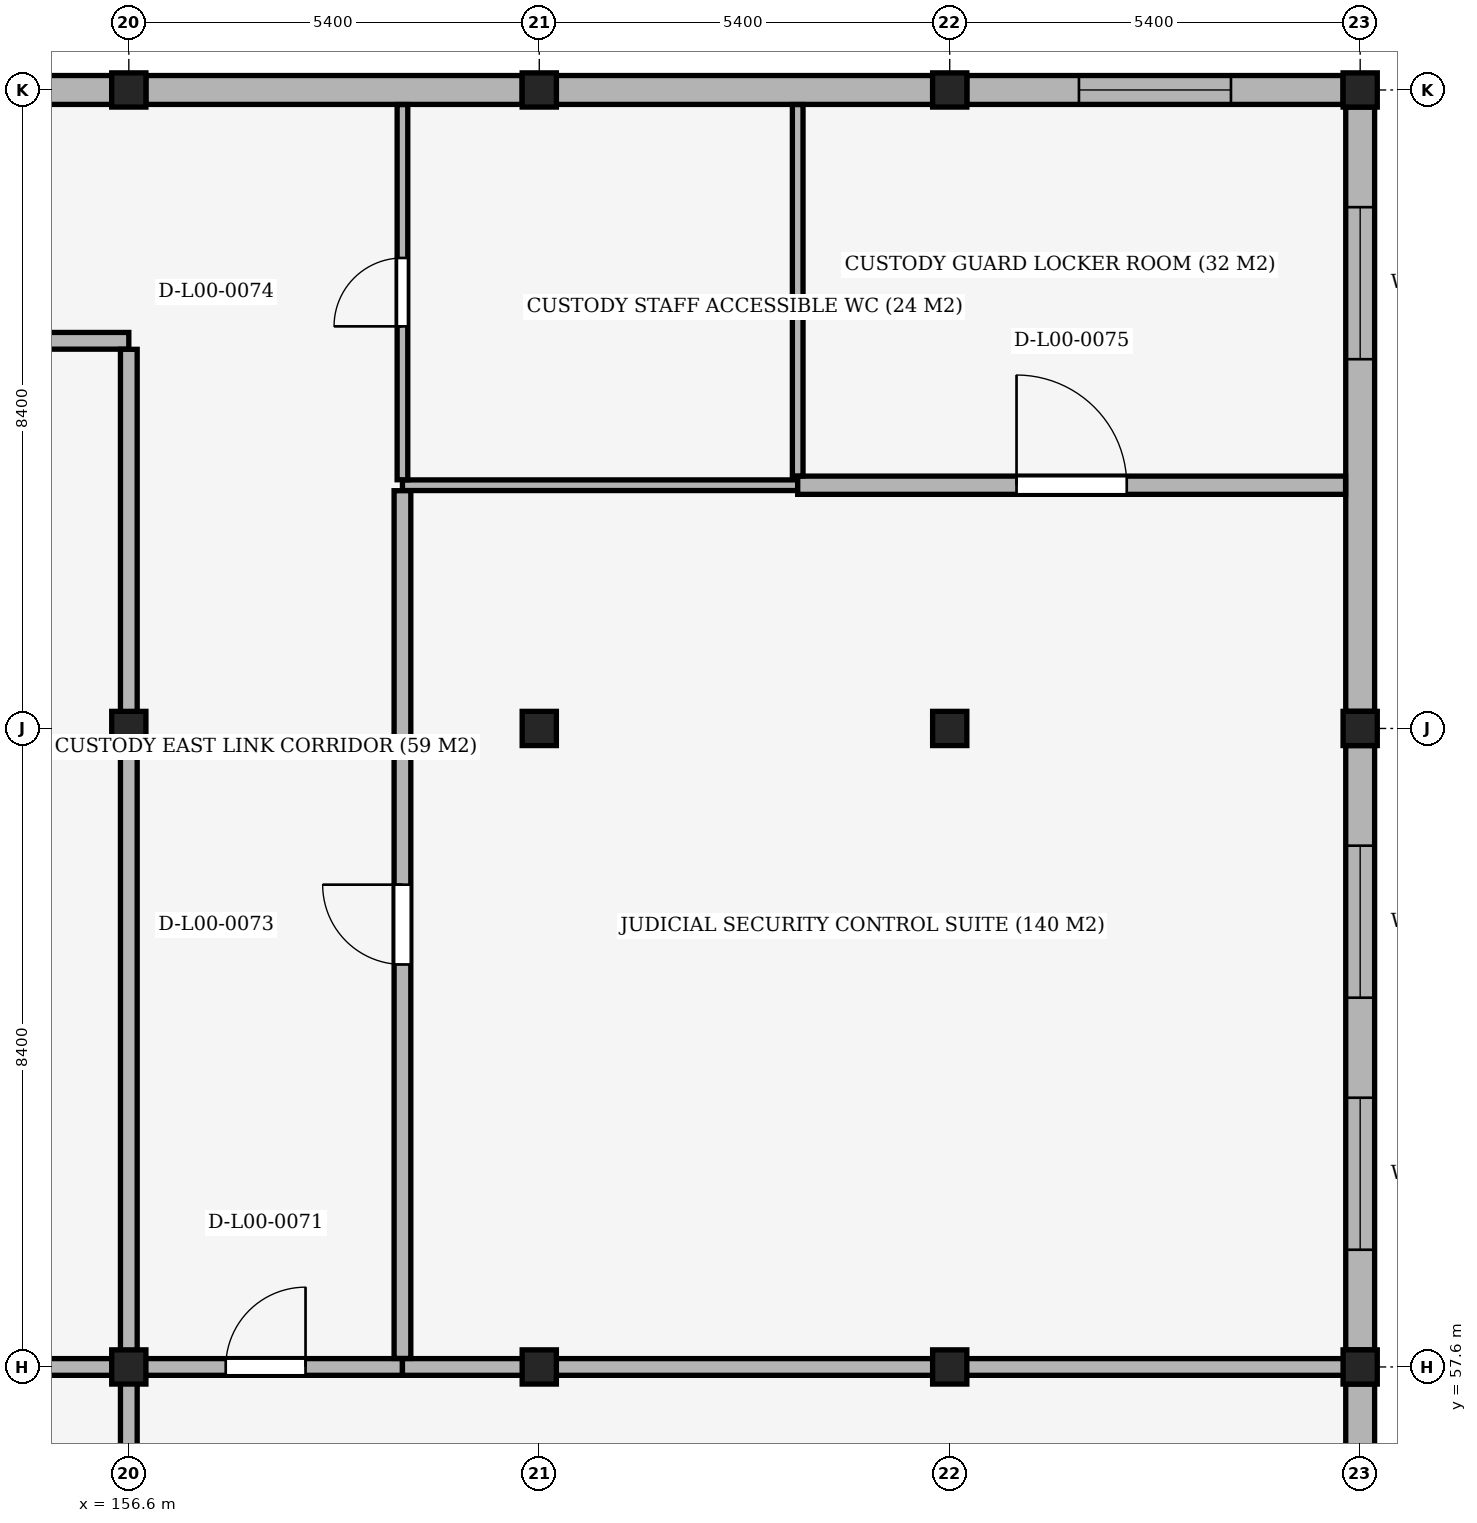
"""IFC4 building model, lengths in metres.
Left out: names, types, materials, properties, quantities, classifications, styles, units other than length and angle.
Written with IfcOpenShell. Run it as: python <this file> out.ifc"""

import sys

from ifc_helpers import new_model, si_unit, direction, frame, frame_2d, origin, origin_2d, place, context, subcontext, project, spatial, rectangle, extrude, element, fill, save


model = new_model("IFC4")
c1 = context("Model", 3, precision=1e-05, world=origin(), true_north=direction((0.0, 1.0)))
c2 = subcontext(c1, "Body", "Model", "MODEL_VIEW")
j1 = project(units=[si_unit("LENGTHUNIT", "METRE"), si_unit("PLANEANGLEUNIT", "RADIAN")], contexts=[c1])
p1 = place(None, origin())
s1 = spatial("IfcSite", under=j1, at=p1, CompositionType="ELEMENT")
p2 = place(p1, origin())
s2 = spatial("IfcBuilding", under=s1, at=p2, CompositionType="ELEMENT")
p3 = place(p2, origin())
s3 = spatial("IfcBuildingStorey", under=s2, at=p3, CompositionType="ELEMENT", Elevation=0.0)
for number, where, z_axis, x_axis in (
    (1, (156.6, 57.6, 0.0), (0.0, 0.0, 1.0), (1.0, 0.0, 0.0)),
    (2, (156.6, 66.0, 0.0), (0.0, 0.0, 1.0), (1.0, 0.0, 0.0)),
    (3, (156.6, 74.4, 0.0), (0.0, 0.0, 1.0), (1.0, 0.0, 0.0)),
    (4, (162.0, 57.6, 0.0), (0.0, 0.0, 1.0), (1.0, 0.0, 0.0)),
    (5, (162.0, 66.0, 0.0), (0.0, 0.0, 1.0), (1.0, 0.0, 0.0)),
    (6, (162.0, 74.4, 0.0), (0.0, 0.0, 1.0), (1.0, 0.0, 0.0)),
    (7, (167.4, 57.6, 0.0), (0.0, 0.0, 1.0), (1.0, 0.0, 0.0)),
    (8, (167.4, 66.0, 0.0), (0.0, 0.0, 1.0), (1.0, 0.0, 0.0)),
    (9, (167.4, 74.4, 0.0), (0.0, 0.0, 1.0), (1.0, 0.0, 0.0)),
    (10, (172.8, 57.6, 0.0), (0.0, 0.0, 1.0), (1.0, 0.0, 0.0)),
    (11, (172.8, 66.0, 0.0), (0.0, 0.0, 1.0), (1.0, 0.0, 0.0)),
    (12, (172.8, 74.4, 0.0), (0.0, 0.0, 1.0), (1.0, 0.0, 0.0)),
):
    element("IfcColumn", number, at=place(p3, frame(where, z_axis=z_axis, x_axis=x_axis)), inside=s3, PredefinedType="COLUMN", context=c2, shape_type="SweptSolid", body=[
        extrude(rectangle(XDim=0.45, YDim=0.45, at=origin_2d()), origin(), (0.0, 0.0, 1.0), 5.1),
    ])
p4 = place(p3, frame((151.425, 74.4, 0.0), z_axis=(0.0, 0.0, 1.0), x_axis=(1.0, 0.0, 0.0)))
e13 = element("IfcWall", 13, at=p4, inside=s3, PredefinedType="SOLIDWALL", context=c2, shape_type="SweptSolid", body=[
    extrude(rectangle(XDim=4.95, YDim=0.38, at=frame_2d((2.475, 0.0))), origin(), (0.0, 0.0, 1.0), 4.07),
])
p5 = place(p4, frame((1.475, 0.0, 2.1)))
e14 = element("IfcOpeningElement", 14, at=p5, cuts=e13, PredefinedType="OPENING", context=c2, shape_type="SweptSolid", body=[
    extrude(rectangle(XDim=2.0, YDim=1.2, at=frame_2d((1.0, 0.6))), frame((0.0, 0.205, 0.0), z_axis=(0.0, -1.0, 0.0), x_axis=(1.0, 0.0, 0.0)), (0.0, 0.0, 1.0), 0.41),
])
for number, where, z_axis, x_axis in (
    (15, (156.825, 74.4, 0.0), (0.0, 0.0, 1.0), (1.0, 0.0, 0.0)),
    (16, (162.225, 74.4, 0.0), (0.0, 0.0, 1.0), (1.0, 0.0, 0.0)),
):
    element("IfcWall", number, at=place(p3, frame(where, z_axis=z_axis, x_axis=x_axis)), inside=s3, PredefinedType="SOLIDWALL", context=c2, shape_type="SweptSolid", body=[
        extrude(rectangle(XDim=4.95, YDim=0.38, at=frame_2d((2.475, 0.0))), origin(), (0.0, 0.0, 1.0), 4.22),
    ])
p6 = place(p3, frame((167.625, 74.4, 0.0), z_axis=(0.0, 0.0, 1.0), x_axis=(1.0, 0.0, 0.0)))
e17 = element("IfcWall", 17, at=p6, inside=s3, PredefinedType="SOLIDWALL", context=c2, shape_type="SweptSolid", body=[
    extrude(rectangle(XDim=4.95, YDim=0.38, at=frame_2d((2.475, 0.0))), origin(), (0.0, 0.0, 1.0), 4.22),
])
p7 = place(p6, frame((1.475, 0.0, 2.1)))
e18 = element("IfcOpeningElement", 18, at=p7, cuts=e17, PredefinedType="OPENING", context=c2, shape_type="SweptSolid", body=[
    extrude(rectangle(XDim=2.0, YDim=1.2, at=frame_2d((1.0, 0.6))), frame((0.0, 0.205, 0.0), z_axis=(0.0, -1.0, 0.0), x_axis=(1.0, 0.0, 0.0)), (0.0, 0.0, 1.0), 0.41),
])
p8 = place(p3, frame((172.8, 74.175, 0.0), z_axis=(0.0, 0.0, 1.0), x_axis=(0.0, -1.0, 0.0)))
e19 = element("IfcWall", 19, at=p8, inside=s3, PredefinedType="SOLIDWALL", context=c2, shape_type="SweptSolid", body=[
    extrude(rectangle(XDim=7.95, YDim=0.38, at=frame_2d((3.975, 0.0))), origin(), (0.0, 0.0, 1.0), 4.02),
])
p9 = place(p8, frame((1.317, 0.0, 2.1)))
e20 = element("IfcOpeningElement", 20, at=p9, cuts=e19, PredefinedType="OPENING", context=c2, shape_type="SweptSolid", body=[
    extrude(rectangle(XDim=2.0, YDim=1.2, at=frame_2d((1.0, 0.6))), frame((0.0, 0.205, 0.0), z_axis=(0.0, -1.0, 0.0), x_axis=(1.0, 0.0, 0.0)), (0.0, 0.0, 1.0), 0.41),
])
p10 = place(p3, frame((172.8, 65.775, 0.0), z_axis=(0.0, 0.0, 1.0), x_axis=(0.0, -1.0, 0.0)))
e21 = element("IfcWall", 21, at=p10, inside=s3, PredefinedType="SOLIDWALL", context=c2, shape_type="SweptSolid", body=[
    extrude(rectangle(XDim=7.95, YDim=0.38, at=frame_2d((3.975, 0.0))), origin(), (0.0, 0.0, 1.0), 4.02),
])
p11 = place(p10, frame((1.317, 0.0, 2.1)))
e22 = element("IfcOpeningElement", 22, at=p11, cuts=e21, PredefinedType="OPENING", context=c2, shape_type="SweptSolid", body=[
    extrude(rectangle(XDim=2.0, YDim=1.2, at=frame_2d((1.0, 0.6))), frame((0.0, 0.205, 0.0), z_axis=(0.0, -1.0, 0.0), x_axis=(1.0, 0.0, 0.0)), (0.0, 0.0, 1.0), 0.41),
])
p12 = place(p10, frame((4.633, 0.0, 2.1)))
e23 = element("IfcOpeningElement", 23, at=p12, cuts=e21, PredefinedType="OPENING", context=c2, shape_type="SweptSolid", body=[
    extrude(rectangle(XDim=2.0, YDim=1.2, at=frame_2d((1.0, 0.6))), frame((0.0, 0.205, 0.0), z_axis=(0.0, -1.0, 0.0), x_axis=(1.0, 0.0, 0.0)), (0.0, 0.0, 1.0), 0.41),
])
p13 = place(p3, frame((172.8, 57.375, 0.0), z_axis=(0.0, 0.0, 1.0), x_axis=(0.0, -1.0, 0.0)))
e24 = element("IfcWall", 24, at=p13, inside=s3, PredefinedType="SOLIDWALL", context=c2, shape_type="SweptSolid", body=[
    extrude(rectangle(XDim=7.95, YDim=0.38, at=frame_2d((3.975, 0.0))), origin(), (0.0, 0.0, 1.0), 4.02),
])
p14 = place(p13, frame((1.317, 0.0, 2.1)))
e25 = element("IfcOpeningElement", 25, at=p14, cuts=e24, PredefinedType="OPENING", context=c2, shape_type="SweptSolid", body=[
    extrude(rectangle(XDim=2.0, YDim=1.2, at=frame_2d((1.0, 0.6))), frame((0.0, 0.205, 0.0), z_axis=(0.0, -1.0, 0.0), x_axis=(1.0, 0.0, 0.0)), (0.0, 0.0, 1.0), 0.41),
])
p15 = place(p13, frame((4.633, 0.0, 2.1)))
e26 = element("IfcOpeningElement", 26, at=p15, cuts=e24, PredefinedType="OPENING", context=c2, shape_type="SweptSolid", body=[
    extrude(rectangle(XDim=2.0, YDim=1.2, at=frame_2d((1.0, 0.6))), frame((0.0, 0.205, 0.0), z_axis=(0.0, -1.0, 0.0), x_axis=(1.0, 0.0, 0.0)), (0.0, 0.0, 1.0), 0.41),
])
p16 = place(p3, frame((138.4, 57.6, 0.0), z_axis=(0.0, 0.0, 1.0), x_axis=(1.0, 0.0, 0.0)))
e27 = element("IfcWall", 27, at=p16, inside=s3, PredefinedType="PARTITIONING", context=c2, shape_type="SweptSolid", body=[
    extrude(rectangle(XDim=18.2, YDim=0.22, at=frame_2d((9.1, 0.0))), origin(), (0.0, 0.0, 1.0), 4.02),
])
p17 = place(p3, frame((156.6, 57.6, 0.0), z_axis=(0.0, 0.0, 1.0), x_axis=(1.0, 0.0, 0.0)))
e28 = element("IfcWall", 28, at=p17, inside=s3, PredefinedType="PARTITIONING", context=c2, shape_type="SweptSolid", body=[
    extrude(rectangle(XDim=3.6, YDim=0.22, at=frame_2d((1.8, 0.0))), origin(), (0.0, 0.0, 1.0), 4.02),
])
p18 = place(p17, frame((1.275, 0.0, 0.0)))
e29 = element("IfcOpeningElement", 29, at=p18, cuts=e28, PredefinedType="OPENING", context=c2, shape_type="SweptSolid", body=[
    extrude(rectangle(XDim=1.05, YDim=2.15, at=frame_2d((0.525, 1.075))), frame((0.0, 0.125, 0.0), z_axis=(0.0, -1.0, 0.0), x_axis=(1.0, 0.0, 0.0)), (0.0, 0.0, 1.0), 0.25),
])
p19 = place(p3, frame((160.2, 57.6, 0.0), z_axis=(0.0, 0.0, 1.0), x_axis=(1.0, 0.0, 0.0)))
e30 = element("IfcWall", 30, at=p19, inside=s3, PredefinedType="PARTITIONING", context=c2, shape_type="SweptSolid", body=[
    extrude(rectangle(XDim=12.541, YDim=0.22, at=frame_2d((6.271, 0.0))), origin(), (0.0, 0.0, 1.0), 4.02),
])
p20 = place(p3, frame((160.2, 69.2, 0.0), z_axis=(0.0, 0.0, 1.0), x_axis=(1.0, 0.0, 0.0)))
e31 = element("IfcWall", 31, at=p20, inside=s3, PredefinedType="PARTITIONING", context=c2, shape_type="SweptSolid", body=[
    extrude(rectangle(XDim=5.2, YDim=0.14, at=frame_2d((2.6, 0.0))), origin(), (0.0, 0.0, 1.0), 4.02),
])
p21 = place(p3, frame((165.4, 69.2, 0.0), z_axis=(0.0, 0.0, 1.0), x_axis=(1.0, 0.0, 0.0)))
e32 = element("IfcWall", 32, at=p21, inside=s3, PredefinedType="PARTITIONING", context=c2, shape_type="SweptSolid", body=[
    extrude(rectangle(XDim=7.208, YDim=0.24, at=frame_2d((3.604, 0.0))), origin(), (0.0, 0.0, 1.0), 4.02),
])
p22 = place(p21, frame((2.879, 0.0, 0.0)))
e33 = element("IfcOpeningElement", 33, at=p22, cuts=e32, PredefinedType="OPENING", context=c2, shape_type="SweptSolid", body=[
    extrude(rectangle(XDim=1.45, YDim=2.25, at=frame_2d((0.725, 1.125))), frame((0.0, 0.135, 0.0), z_axis=(0.0, -1.0, 0.0), x_axis=(1.0, 0.0, 0.0)), (0.0, 0.0, 1.0), 0.27),
])
p23 = place(p3, frame((138.4, 71.1, 0.0), z_axis=(0.0, 0.0, 1.0), x_axis=(1.0, 0.0, 0.0)))
e34 = element("IfcWall", 34, at=p23, inside=s3, PredefinedType="PARTITIONING", context=c2, shape_type="SweptSolid", body=[
    extrude(rectangle(XDim=18.2, YDim=0.22, at=frame_2d((9.1, 0.0))), origin(), (0.0, 0.0, 1.0), 4.02),
])
p24 = place(p23, frame((8.575, 0.0, 0.0)))
e35 = element("IfcOpeningElement", 35, at=p24, cuts=e34, PredefinedType="OPENING", context=c2, shape_type="SweptSolid", body=[
    extrude(rectangle(XDim=1.05, YDim=2.15, at=frame_2d((0.525, 1.075))), frame((0.0, 0.125, 0.0), z_axis=(0.0, -1.0, 0.0), x_axis=(1.0, 0.0, 0.0)), (0.0, 0.0, 1.0), 0.25),
])
p25 = place(p3, frame((156.6, 40.853, 0.0), z_axis=(0.0, 0.0, 1.0), x_axis=(0.0, 1.0, 0.0)))
e36 = element("IfcWall", 36, at=p25, inside=s3, PredefinedType="PARTITIONING", context=c2, shape_type="SweptSolid", body=[
    extrude(rectangle(XDim=16.635, YDim=0.22, at=frame_2d((8.317, 0.0))), origin(), (0.0, 0.0, 1.0), 4.02),
])
p26 = place(p3, frame((156.6, 57.712, 0.0), z_axis=(0.0, 0.0, 1.0), x_axis=(0.0, 1.0, 0.0)))
e37 = element("IfcWall", 37, at=p26, inside=s3, PredefinedType="PARTITIONING", context=c2, shape_type="SweptSolid", body=[
    extrude(rectangle(XDim=13.276, YDim=0.22, at=frame_2d((6.638, 0.0))), origin(), (0.0, 0.0, 1.0), 4.02),
])
p27 = place(p3, frame((160.2, 57.712, 0.0), z_axis=(0.0, 0.0, 1.0), x_axis=(0.0, 1.0, 0.0)))
e38 = element("IfcWall", 38, at=p27, inside=s3, PredefinedType="PARTITIONING", context=c2, shape_type="SweptSolid", body=[
    extrude(rectangle(XDim=11.416, YDim=0.22, at=frame_2d((5.708, 0.0))), origin(), (0.0, 0.0, 1.0), 4.22),
])
p28 = place(p27, frame((5.183, 0.0, 0.0)))
e39 = element("IfcOpeningElement", 39, at=p28, cuts=e38, PredefinedType="OPENING", context=c2, shape_type="SweptSolid", body=[
    extrude(rectangle(XDim=1.05, YDim=2.1, at=frame_2d((0.525, 1.05))), frame((0.0, 0.125, 0.0), z_axis=(0.0, -1.0, 0.0), x_axis=(1.0, 0.0, 0.0)), (0.0, 0.0, 1.0), 0.25),
])
p29 = place(p3, frame((160.2, 69.272, 0.0), z_axis=(0.0, 0.0, 1.0), x_axis=(0.0, 1.0, 0.0)))
e40 = element("IfcWall", 40, at=p29, inside=s3, PredefinedType="PARTITIONING", context=c2, shape_type="SweptSolid", body=[
    extrude(rectangle(XDim=4.936, YDim=0.14, at=frame_2d((2.468, 0.0))), origin(), (0.0, 0.0, 1.0), 4.22),
])
p30 = place(p29, frame((2.018, 0.0, 0.0)))
e41 = element("IfcOpeningElement", 41, at=p30, cuts=e40, PredefinedType="OPENING", context=c2, shape_type="SweptSolid", body=[
    extrude(rectangle(XDim=0.9, YDim=2.1, at=frame_2d((0.45, 1.05))), frame((0.0, 0.085, 0.0), z_axis=(0.0, -1.0, 0.0), x_axis=(1.0, 0.0, 0.0)), (0.0, 0.0, 1.0), 0.17),
])
p31 = place(p3, frame((165.4, 69.322, 0.0), z_axis=(0.0, 0.0, 1.0), x_axis=(0.0, 1.0, 0.0)))
e42 = element("IfcWall", 42, at=p31, inside=s3, PredefinedType="PARTITIONING", context=c2, shape_type="SweptSolid", body=[
    extrude(rectangle(XDim=4.886, YDim=0.14, at=frame_2d((2.443, 0.0))), origin(), (0.0, 0.0, 1.0), 4.22),
])
p32 = place(p7, origin())
e43 = element("IfcWindow", 43, at=p32, inside=s3, PartitioningType="SINGLE_PANEL", PredefinedType="WINDOW", context=c2, shape_type="SweptSolid", body=[
    extrude(rectangle(XDim=2.0, YDim=1.2, at=frame_2d((1.0, 0.6))), frame((0.0, 0.03, 0.0), z_axis=(0.0, -1.0, 0.0), x_axis=(1.0, 0.0, 0.0)), (0.0, 0.0, 1.0), 0.06),
])
fill(e18, e43)
p33 = place(p9, origin())
e44 = element("IfcWindow", 44, at=p33, inside=s3, PartitioningType="SINGLE_PANEL", PredefinedType="WINDOW", context=c2, shape_type="SweptSolid", body=[
    extrude(rectangle(XDim=2.0, YDim=1.2, at=frame_2d((1.0, 0.6))), frame((0.0, 0.03, 0.0), z_axis=(0.0, -1.0, 0.0), x_axis=(1.0, 0.0, 0.0)), (0.0, 0.0, 1.0), 0.06),
])
fill(e20, e44)
p34 = place(p11, origin())
e45 = element("IfcWindow", 45, at=p34, inside=s3, PartitioningType="SINGLE_PANEL", PredefinedType="WINDOW", context=c2, shape_type="SweptSolid", body=[
    extrude(rectangle(XDim=2.0, YDim=1.2, at=frame_2d((1.0, 0.6))), frame((0.0, 0.03, 0.0), z_axis=(0.0, -1.0, 0.0), x_axis=(1.0, 0.0, 0.0)), (0.0, 0.0, 1.0), 0.06),
])
fill(e22, e45)
p35 = place(p12, origin())
e46 = element("IfcWindow", 46, at=p35, inside=s3, PartitioningType="SINGLE_PANEL", PredefinedType="WINDOW", context=c2, shape_type="SweptSolid", body=[
    extrude(rectangle(XDim=2.0, YDim=1.2, at=frame_2d((1.0, 0.6))), frame((0.0, 0.03, 0.0), z_axis=(0.0, -1.0, 0.0), x_axis=(1.0, 0.0, 0.0)), (0.0, 0.0, 1.0), 0.06),
])
fill(e23, e46)
p36 = place(p18, origin())
e47 = element("IfcDoor", 47, at=p36, inside=s3, OperationType="SINGLE_SWING_RIGHT", PredefinedType="DOOR", context=c2, shape_type="SweptSolid", body=[
    extrude(rectangle(XDim=1.05, YDim=2.15, at=frame_2d((0.525, 1.075))), frame((0.0, 0.025, 0.0), z_axis=(0.0, -1.0, 0.0), x_axis=(1.0, 0.0, 0.0)), (0.0, 0.0, 1.0), 0.05),
])
fill(e29, e47)
p37 = place(p28, origin())
e48 = element("IfcDoor", 48, at=p37, inside=s3, OperationType="SINGLE_SWING_RIGHT", PredefinedType="DOOR", context=c2, shape_type="SweptSolid", body=[
    extrude(rectangle(XDim=1.05, YDim=2.1, at=frame_2d((0.525, 1.05))), frame((0.0, 0.025, 0.0), z_axis=(0.0, -1.0, 0.0), x_axis=(1.0, 0.0, 0.0)), (0.0, 0.0, 1.0), 0.05),
])
fill(e39, e48)
p38 = place(p30, origin())
e49 = element("IfcDoor", 49, at=p38, inside=s3, OperationType="SINGLE_SWING_LEFT", PredefinedType="DOOR", context=c2, shape_type="SweptSolid", body=[
    extrude(rectangle(XDim=0.9, YDim=2.1, at=frame_2d((0.45, 1.05))), frame((0.0, 0.025, 0.0), z_axis=(0.0, -1.0, 0.0), x_axis=(1.0, 0.0, 0.0)), (0.0, 0.0, 1.0), 0.05),
])
fill(e41, e49)
p39 = place(p22, origin())
e50 = element("IfcDoor", 50, at=p39, inside=s3, OperationType="SINGLE_SWING_LEFT", PredefinedType="DOOR", context=c2, shape_type="SweptSolid", body=[
    extrude(rectangle(XDim=1.45, YDim=2.25, at=frame_2d((0.725, 1.125))), frame((0.0, 0.025, 0.0), z_axis=(0.0, -1.0, 0.0), x_axis=(1.0, 0.0, 0.0)), (0.0, 0.0, 1.0), 0.05),
])
fill(e33, e50)
save(model, sys.argv[1])
